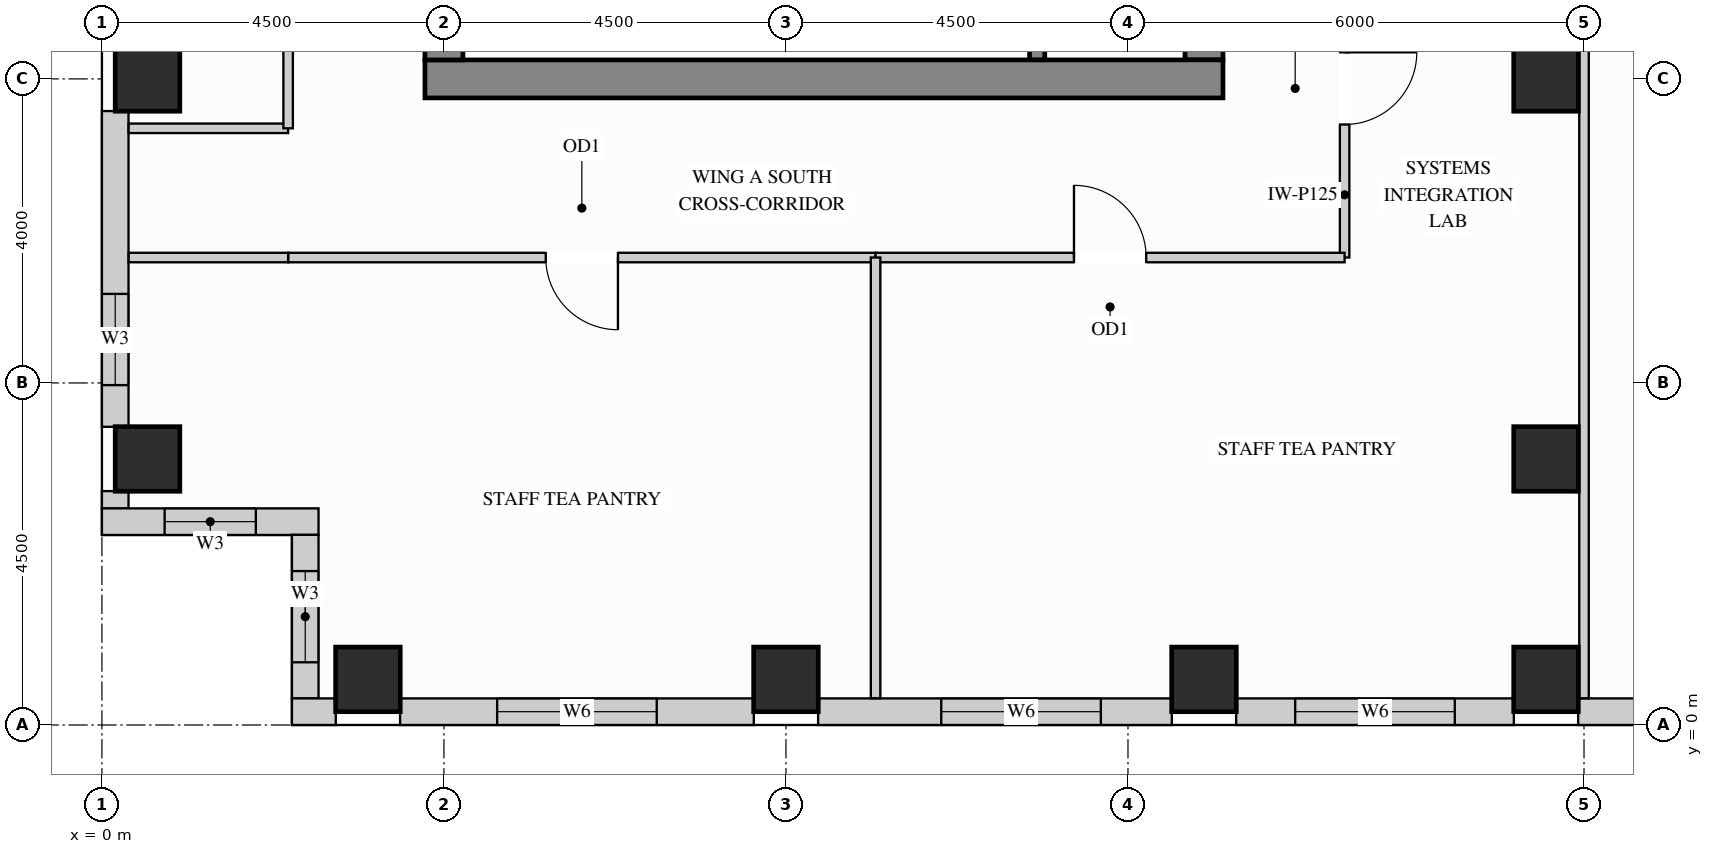
"""IFC4 building model, lengths in metres.
Left out: names, types, materials, properties, quantities, classifications, styles, units other than length and angle.
Written with IfcOpenShell. Run it as: python <this file> out.ifc"""

import sys

from ifc_helpers import new_model, si_unit, direction, frame, frame_2d, origin, origin_2d, place, context, subcontext, project, spatial, rectangle, extrude, source, transform, mapped, element, fill, save


model = new_model("IFC4")
c1 = context("Model", 3, precision=1e-05, world=origin(), true_north=direction((0.0, 1.0)))
c2 = subcontext(c1, "Body", "Model", "MODEL_VIEW")
j1 = project(units=[si_unit("LENGTHUNIT", "METRE"), si_unit("PLANEANGLEUNIT", "RADIAN")], contexts=[c1])
p1 = place(None, origin())
s1 = spatial("IfcSite", under=j1, at=p1, CompositionType="ELEMENT")
p2 = place(p1, origin())
s2 = spatial("IfcBuilding", under=s1, at=p2, CompositionType="ELEMENT")
p3 = place(p2, frame((0.0, 0.0, 266.4)))
s3 = spatial("IfcBuildingStorey", under=s2, at=p3, CompositionType="ELEMENT", Elevation=266.4)
m1 = source(origin(), c2, "Body", "SweptSolid", [
    extrude(rectangle(XDim=0.85, YDim=0.85, at=origin_2d()), origin(), (0.0, 0.0, 1.0), 3.4),
])
for number, where, z_axis, x_axis in (
    (1, (19.0, 3.5, 0.0), (0.0, 0.0, 1.0), (1.0, 0.0, 0.0)),
    (2, (19.0, 8.5, 0.0), (0.0, 0.0, 1.0), (1.0, 0.0, 0.0)),
    (3, (14.5, 0.6, 0.0), (0.0, 0.0, 1.0), (1.0, 0.0, 0.0)),
    (4, (19.0, 0.6, 0.0), (0.0, 0.0, 1.0), (1.0, 0.0, 0.0)),
    (5, (3.5, 0.6, 0.0), (0.0, 0.0, 1.0), (1.0, 0.0, 0.0)),
    (6, (9.0, 0.6, 0.0), (0.0, 0.0, 1.0), (1.0, 0.0, 0.0)),
    (7, (0.6, 3.5, 0.0), (0.0, 0.0, 1.0), (1.0, 0.0, 0.0)),
    (8, (0.6, 8.5, 0.0), (0.0, 0.0, 1.0), (1.0, 0.0, 0.0)),
):
    element("IfcColumn", number, at=place(p3, frame(where, z_axis=z_axis, x_axis=x_axis)), inside=s3, PredefinedType="COLUMN", context=c2, shape_type="MappedRepresentation", body=[
        mapped(m1, transform((0.0, 0.0, 0.0), x_axis=(1.0, 0.0, 0.0), y_axis=(0.0, 1.0, 0.0), z_axis=(0.0, 0.0, 1.0))),
    ])
m2 = source(origin(), c2, "Body", "SweptSolid", [
    extrude(rectangle(XDim=10.07, YDim=0.5, at=frame_2d((5.035, 0.0))), origin(), (0.0, 0.0, 1.0), 3.4),
])
p4 = place(p3, frame((14.5, 8.75, 0.0), z_axis=(0.0, 0.0, 1.0), x_axis=(0.0, 1.0, 0.0)))
e9 = element("IfcWall", 9, at=p4, inside=s3, PredefinedType="SHEAR", context=c2, shape_type="MappedRepresentation", body=[
    mapped(m2, transform((0.0, 0.0, 0.0), x_axis=(1.0, 0.0, 0.0), y_axis=(0.0, 1.0, 0.0), z_axis=(0.0, 0.0, 1.0))),
])
m3 = source(origin(), c2, "Body", "SweptSolid", [
    extrude(rectangle(XDim=10.5, YDim=0.5, at=frame_2d((5.25, 0.0))), origin(), (0.0, 0.0, 1.0), 3.4),
])
p5 = place(p3, frame((4.25, 8.5, 0.0), z_axis=(0.0, 0.0, 1.0), x_axis=(1.0, 0.0, 0.0)))
e10 = element("IfcWall", 10, at=p5, inside=s3, PredefinedType="SHEAR", context=c2, shape_type="MappedRepresentation", body=[
    mapped(m3, transform((0.0, 0.0, 0.0), x_axis=(1.0, 0.0, 0.0), y_axis=(0.0, 1.0, 0.0), z_axis=(0.0, 0.0, 1.0))),
])
m4 = source(origin(), c2, "Body", "SweptSolid", [
    extrude(rectangle(XDim=20.5, YDim=0.5, at=frame_2d((10.25, 0.0))), origin(), (0.0, 0.0, 1.0), 3.4),
])
p6 = place(p3, frame((4.5, 8.75, 0.0), z_axis=(0.0, 0.0, 1.0), x_axis=(0.0, 1.0, 0.0)))
e11 = element("IfcWall", 11, at=p6, inside=s3, PredefinedType="SHEAR", context=c2, shape_type="MappedRepresentation", body=[
    mapped(m4, transform((0.0, 0.0, 0.0), x_axis=(1.0, 0.0, 0.0), y_axis=(0.0, 1.0, 0.0), z_axis=(0.0, 0.0, 1.0))),
])
p7 = place(p3, frame((0.175, 8.077, 0.0), z_axis=(0.0, 0.0, 1.0), x_axis=(0.0, -1.0, 0.0)))
e12 = element("IfcWall", 12, at=p7, inside=s3, PredefinedType="SOLIDWALL", context=c2, shape_type="SweptSolid", body=[
    extrude(rectangle(XDim=4.154, YDim=0.35, at=frame_2d((2.077, 0.0))), origin(), (0.0, 0.0, 1.0), 3.385),
])
p8 = place(p7, frame((2.406, 0.0, 0.78)))
e13 = element("IfcOpeningElement", 13, at=p8, cuts=e12, PredefinedType="OPENING", context=c2, shape_type="SweptSolid", body=[
    extrude(rectangle(XDim=1.2, YDim=2.25, at=frame_2d((0.6, 1.125))), frame((0.0, 0.185, 0.0), z_axis=(0.0, -1.0, 0.0), x_axis=(1.0, 0.0, 0.0)), (0.0, 0.0, 1.0), 0.37),
])
m5 = source(origin(), c2, "Body", "SweptSolid", [
    extrude(rectangle(XDim=0.229, YDim=0.35, at=frame_2d((0.115, 0.0))), origin(), (0.0, 0.0, 1.0), 3.385),
])
p9 = place(p3, frame((0.175, 3.077, 0.0), z_axis=(0.0, 0.0, 1.0), x_axis=(0.0, -1.0, 0.0)))
e14 = element("IfcWall", 14, at=p9, inside=s3, PredefinedType="SOLIDWALL", context=c2, shape_type="MappedRepresentation", body=[
    mapped(m5, transform((0.0, 0.0, 0.0), x_axis=(1.0, 0.0, 0.0), y_axis=(0.0, 1.0, 0.0), z_axis=(0.0, 0.0, 1.0))),
])
p10 = place(p3, frame((0.0, 2.675, 0.0), z_axis=(0.0, 0.0, 1.0), x_axis=(1.0, 0.0, 0.0)))
e15 = element("IfcWall", 15, at=p10, inside=s3, PredefinedType="SOLIDWALL", context=c2, shape_type="SweptSolid", body=[
    extrude(rectangle(XDim=2.85, YDim=0.35, at=frame_2d((1.425, 0.0))), origin(), (0.0, 0.0, 1.0), 3.385),
])
p11 = place(p10, frame((0.825, 0.0, 0.78)))
e16 = element("IfcOpeningElement", 16, at=p11, cuts=e15, PredefinedType="OPENING", context=c2, shape_type="SweptSolid", body=[
    extrude(rectangle(XDim=1.2, YDim=2.25, at=frame_2d((0.6, 1.125))), frame((0.0, 0.185, 0.0), z_axis=(0.0, -1.0, 0.0), x_axis=(1.0, 0.0, 0.0)), (0.0, 0.0, 1.0), 0.37),
])
p12 = place(p3, frame((2.675, 2.502, 0.0), z_axis=(0.0, 0.0, 1.0), x_axis=(0.0, -1.0, 0.0)))
e17 = element("IfcWall", 17, at=p12, inside=s3, PredefinedType="SOLIDWALL", context=c2, shape_type="SweptSolid", body=[
    extrude(rectangle(XDim=2.154, YDim=0.35, at=frame_2d((1.077, 0.0))), origin(), (0.0, 0.0, 1.0), 3.385),
])
p13 = place(p12, frame((0.477, 0.0, 0.78)))
e18 = element("IfcOpeningElement", 18, at=p13, cuts=e17, PredefinedType="OPENING", context=c2, shape_type="SweptSolid", body=[
    extrude(rectangle(XDim=1.2, YDim=2.25, at=frame_2d((0.6, 1.125))), frame((0.0, 0.185, 0.0), z_axis=(0.0, -1.0, 0.0), x_axis=(1.0, 0.0, 0.0)), (0.0, 0.0, 1.0), 0.37),
])
m6 = source(origin(), c2, "Body", "SweptSolid", [
    extrude(rectangle(XDim=0.577, YDim=0.35, at=frame_2d((0.289, 0.0))), origin(), (0.0, 0.0, 1.0), 3.385),
])
p14 = place(p3, frame((2.5, 0.175, 0.0), z_axis=(0.0, 0.0, 1.0), x_axis=(1.0, 0.0, 0.0)))
e19 = element("IfcWall", 19, at=p14, inside=s3, PredefinedType="SOLIDWALL", context=c2, shape_type="MappedRepresentation", body=[
    mapped(m6, transform((0.0, 0.0, 0.0), x_axis=(1.0, 0.0, 0.0), y_axis=(0.0, 1.0, 0.0), z_axis=(0.0, 0.0, 1.0))),
])
p15 = place(p3, frame((3.923, 0.175, 0.0), z_axis=(0.0, 0.0, 1.0), x_axis=(1.0, 0.0, 0.0)))
e20 = element("IfcWall", 20, at=p15, inside=s3, PredefinedType="SOLIDWALL", context=c2, shape_type="SweptSolid", body=[
    extrude(rectangle(XDim=4.654, YDim=0.35, at=frame_2d((2.327, 0.0))), origin(), (0.0, 0.0, 1.0), 3.385),
])
p16 = place(p15, frame((1.277, 0.0, 0.78)))
e21 = element("IfcOpeningElement", 21, at=p16, cuts=e20, PredefinedType="OPENING", context=c2, shape_type="SweptSolid", body=[
    extrude(rectangle(XDim=2.1, YDim=2.25, at=frame_2d((1.05, 1.125))), frame((0.0, 0.185, 0.0), z_axis=(0.0, -1.0, 0.0), x_axis=(1.0, 0.0, 0.0)), (0.0, 0.0, 1.0), 0.37),
])
p17 = place(p3, frame((9.423, 0.175, 0.0), z_axis=(0.0, 0.0, 1.0), x_axis=(1.0, 0.0, 0.0)))
e22 = element("IfcWall", 22, at=p17, inside=s3, PredefinedType="SOLIDWALL", context=c2, shape_type="SweptSolid", body=[
    extrude(rectangle(XDim=4.654, YDim=0.35, at=frame_2d((2.327, 0.0))), origin(), (0.0, 0.0, 1.0), 3.385),
])
p18 = place(p17, frame((1.62, 0.0, 0.78)))
e23 = element("IfcOpeningElement", 23, at=p18, cuts=e22, PredefinedType="OPENING", context=c2, shape_type="SweptSolid", body=[
    extrude(rectangle(XDim=2.1, YDim=2.25, at=frame_2d((1.05, 1.125))), frame((0.0, 0.185, 0.0), z_axis=(0.0, -1.0, 0.0), x_axis=(1.0, 0.0, 0.0)), (0.0, 0.0, 1.0), 0.37),
])
p19 = place(p3, frame((14.923, 0.175, 0.0), z_axis=(0.0, 0.0, 1.0), x_axis=(1.0, 0.0, 0.0)))
e24 = element("IfcWall", 24, at=p19, inside=s3, PredefinedType="SOLIDWALL", context=c2, shape_type="SweptSolid", body=[
    extrude(rectangle(XDim=3.654, YDim=0.35, at=frame_2d((1.827, 0.0))), origin(), (0.0, 0.0, 1.0), 3.385),
])
p20 = place(p19, frame((0.777, 0.0, 0.78)))
e25 = element("IfcOpeningElement", 25, at=p20, cuts=e24, PredefinedType="OPENING", context=c2, shape_type="SweptSolid", body=[
    extrude(rectangle(XDim=2.1, YDim=2.25, at=frame_2d((1.05, 1.125))), frame((0.0, 0.185, 0.0), z_axis=(0.0, -1.0, 0.0), x_axis=(1.0, 0.0, 0.0)), (0.0, 0.0, 1.0), 0.37),
])
p21 = place(p3, frame((19.423, 0.175, 0.0), z_axis=(0.0, 0.0, 1.0), x_axis=(1.0, 0.0, 0.0)))
e26 = element("IfcWall", 26, at=p21, inside=s3, PredefinedType="SOLIDWALL", context=c2, shape_type="SweptSolid", body=[
    extrude(rectangle(XDim=3.554, YDim=0.35, at=frame_2d((1.777, 0.0))), origin(), (0.0, 0.0, 1.0), 3.385),
])
p22 = place(p21, frame((1.031, 0.0, 0.78)))
e27 = element("IfcOpeningElement", 27, at=p22, cuts=e26, PredefinedType="OPENING", context=c2, shape_type="SweptSolid", body=[
    extrude(rectangle(XDim=1.5, YDim=2.0, at=frame_2d((0.75, 1.0))), frame((0.0, 0.185, 0.0), z_axis=(0.0, -1.0, 0.0), x_axis=(1.0, 0.0, 0.0)), (0.0, 0.0, 1.0), 0.37),
])
p23 = place(p3, frame((16.35, 6.15, 0.0), z_axis=(0.0, 0.0, 1.0), x_axis=(0.0, 1.0, 0.0)))
e28 = element("IfcWall", 28, at=p23, inside=s3, PredefinedType="PARTITIONING", context=c2, shape_type="SweptSolid", body=[
    extrude(rectangle(XDim=4.45, YDim=0.125, at=frame_2d((2.225, 0.0))), origin(), (0.0, 0.0, 1.0), 3.385),
])
p24 = place(p23, frame((1.75, 0.0, 0.0)))
e29 = element("IfcOpeningElement", 29, at=p24, cuts=e28, PredefinedType="OPENING", context=c2, shape_type="SweptSolid", body=[
    extrude(rectangle(XDim=0.95, YDim=2.15, at=frame_2d((0.475, 1.075))), frame((0.0, 0.073, 0.0), z_axis=(0.0, -1.0, 0.0), x_axis=(1.0, 0.0, 0.0)), (0.0, 0.0, 1.0), 0.145),
])
m7 = source(origin(), c2, "Body", "SweptSolid", [
    extrude(rectangle(XDim=2.098, YDim=0.125, at=frame_2d((1.049, 0.0))), origin(), (0.0, 0.0, 1.0), 3.385),
])
p25 = place(p3, frame((0.352, 7.85, 0.0), z_axis=(0.0, 0.0, 1.0), x_axis=(1.0, 0.0, 0.0)))
e30 = element("IfcWall", 30, at=p25, inside=s3, PredefinedType="PARTITIONING", context=c2, shape_type="MappedRepresentation", body=[
    mapped(m7, transform((0.0, 0.0, 0.0), x_axis=(1.0, 0.0, 0.0), y_axis=(0.0, 1.0, 0.0), z_axis=(0.0, 0.0, 1.0))),
])
m8 = source(origin(), c2, "Body", "SweptSolid", [
    extrude(rectangle(XDim=10.248, YDim=0.125, at=frame_2d((5.124, 0.0))), origin(), (0.0, 0.0, 1.0), 3.385),
])
p26 = place(p3, frame((19.5, 0.352, 0.0), z_axis=(0.0, 0.0, 1.0), x_axis=(0.0, 1.0, 0.0)))
e31 = element("IfcWall", 31, at=p26, inside=s3, PredefinedType="PARTITIONING", context=c2, shape_type="MappedRepresentation", body=[
    mapped(m8, transform((0.0, 0.0, 0.0), x_axis=(1.0, 0.0, 0.0), y_axis=(0.0, 1.0, 0.0), z_axis=(0.0, 0.0, 1.0))),
])
p27 = place(p3, frame((2.45, 6.15, 0.0), z_axis=(0.0, 0.0, 1.0), x_axis=(1.0, 0.0, 0.0)))
e32 = element("IfcWall", 32, at=p27, inside=s3, PredefinedType="PARTITIONING", context=c2, shape_type="SweptSolid", body=[
    extrude(rectangle(XDim=7.729, YDim=0.125, at=frame_2d((3.865, 0.0))), origin(), (0.0, 0.0, 1.0), 3.385),
])
p28 = place(p27, frame((3.389, 0.0, 0.0)))
e33 = element("IfcOpeningElement", 33, at=p28, cuts=e32, PredefinedType="OPENING", context=c2, shape_type="SweptSolid", body=[
    extrude(rectangle(XDim=0.95, YDim=2.15, at=frame_2d((0.475, 1.075))), frame((0.0, 0.073, 0.0), z_axis=(0.0, -1.0, 0.0), x_axis=(1.0, 0.0, 0.0)), (0.0, 0.0, 1.0), 0.145),
])
p29 = place(p3, frame((10.179, 6.15, 0.0), z_axis=(0.0, 0.0, 1.0), x_axis=(1.0, 0.0, 0.0)))
e34 = element("IfcWall", 34, at=p29, inside=s3, PredefinedType="PARTITIONING", context=c2, shape_type="SweptSolid", body=[
    extrude(rectangle(XDim=6.171, YDim=0.125, at=frame_2d((3.085, 0.0))), origin(), (0.0, 0.0, 1.0), 3.385),
])
p30 = place(p29, frame((2.611, 0.0, 0.0)))
e35 = element("IfcOpeningElement", 35, at=p30, cuts=e34, PredefinedType="OPENING", context=c2, shape_type="SweptSolid", body=[
    extrude(rectangle(XDim=0.95, YDim=2.15, at=frame_2d((0.475, 1.075))), frame((0.0, 0.073, 0.0), z_axis=(0.0, -1.0, 0.0), x_axis=(1.0, 0.0, 0.0)), (0.0, 0.0, 1.0), 0.145),
])
p31 = place(p3, frame((0.352, 6.15, 0.0), z_axis=(0.0, 0.0, 1.0), x_axis=(1.0, 0.0, 0.0)))
e36 = element("IfcWall", 36, at=p31, inside=s3, PredefinedType="PARTITIONING", context=c2, shape_type="MappedRepresentation", body=[
    mapped(m7, transform((0.0, 0.0, 0.0), x_axis=(1.0, 0.0, 0.0), y_axis=(0.0, 1.0, 0.0), z_axis=(0.0, 0.0, 1.0))),
])
m9 = source(origin(), c2, "Body", "SweptSolid", [
    extrude(rectangle(XDim=5.798, YDim=0.125, at=frame_2d((2.899, 0.0))), origin(), (0.0, 0.0, 1.0), 3.385),
])
p32 = place(p3, frame((10.179, 0.352, 0.0), z_axis=(0.0, 0.0, 1.0), x_axis=(0.0, 1.0, 0.0)))
e37 = element("IfcWall", 37, at=p32, inside=s3, PredefinedType="PARTITIONING", context=c2, shape_type="MappedRepresentation", body=[
    mapped(m9, transform((0.0, 0.0, 0.0), x_axis=(1.0, 0.0, 0.0), y_axis=(0.0, 1.0, 0.0), z_axis=(0.0, 0.0, 1.0))),
])
p33 = place(p3, frame((2.45, 7.85, 0.0), z_axis=(0.0, 0.0, 1.0), x_axis=(0.0, 1.0, 0.0)))
e38 = element("IfcWall", 38, at=p33, inside=s3, PredefinedType="PARTITIONING", context=c2, shape_type="SweptSolid", body=[
    extrude(rectangle(XDim=7.25, YDim=0.125, at=frame_2d((3.625, 0.0))), origin(), (0.0, 0.0, 1.0), 3.385),
])
p34 = place(p33, frame((3.15, 0.0, 0.0)))
e39 = element("IfcOpeningElement", 39, at=p34, cuts=e38, PredefinedType="OPENING", context=c2, shape_type="SweptSolid", body=[
    extrude(rectangle(XDim=0.95, YDim=2.15, at=frame_2d((0.475, 1.075))), frame((0.0, 0.073, 0.0), z_axis=(0.0, -1.0, 0.0), x_axis=(1.0, 0.0, 0.0)), (0.0, 0.0, 1.0), 0.145),
])
m10 = source(origin(), c2, "Body", "SweptSolid", [
    extrude(rectangle(XDim=3.803, YDim=0.2, at=frame_2d((1.901, 0.0))), origin(), (0.0, 0.0, 1.0), 3.4),
])
p35 = place(p3, frame((12.305, 8.752, 0.0), z_axis=(0.0, 0.0, 1.0), x_axis=(0.0, 1.0, 0.0)))
e40 = element("IfcWall", 40, at=p35, inside=s3, PredefinedType="SHEAR", context=c2, shape_type="MappedRepresentation", body=[
    mapped(m10, transform((0.0, 0.0, 0.0), x_axis=(1.0, 0.0, 0.0), y_axis=(0.0, 1.0, 0.0), z_axis=(0.0, 0.0, 1.0))),
])
m11 = source(origin(), c2, "Body", "SweptSolid", [
    extrude(rectangle(XDim=0.95, YDim=2.15, at=frame_2d((0.475, 1.075))), frame((0.0, 0.025, 0.0), z_axis=(0.0, -1.0, 0.0), x_axis=(1.0, 0.0, 0.0)), (0.0, 0.0, 1.0), 0.05),
])
p36 = place(p24, origin())
e41 = element("IfcDoor", 41, at=p36, inside=s3, OperationType="SINGLE_SWING_RIGHT", PredefinedType="DOOR", context=c2, shape_type="MappedRepresentation", body=[
    mapped(m11, transform((0.0, 0.0, 0.0), x_axis=(1.0, 0.0, 0.0), y_axis=(0.0, 1.0, 0.0), z_axis=(0.0, 0.0, 1.0))),
])
fill(e29, e41)
p37 = place(p28, origin())
e42 = element("IfcDoor", 42, at=p37, inside=s3, OperationType="SINGLE_SWING_RIGHT", PredefinedType="DOOR", context=c2, shape_type="MappedRepresentation", body=[
    mapped(m11, transform((0.0, 0.0, 0.0), x_axis=(1.0, 0.0, 0.0), y_axis=(0.0, 1.0, 0.0), z_axis=(0.0, 0.0, 1.0))),
])
fill(e33, e42)
p38 = place(p30, origin())
e43 = element("IfcDoor", 43, at=p38, inside=s3, OperationType="SINGLE_SWING_LEFT", PredefinedType="DOOR", context=c2, shape_type="MappedRepresentation", body=[
    mapped(m11, transform((0.0, 0.0, 0.0), x_axis=(1.0, 0.0, 0.0), y_axis=(0.0, 1.0, 0.0), z_axis=(0.0, 0.0, 1.0))),
])
fill(e35, e43)
m12 = source(origin(), c2, "Body", "SweptSolid", [
    extrude(rectangle(XDim=1.2, YDim=2.25, at=frame_2d((0.6, 1.125))), frame((0.0, 0.03, 0.0), z_axis=(0.0, -1.0, 0.0), x_axis=(1.0, 0.0, 0.0)), (0.0, 0.0, 1.0), 0.06),
])
p39 = place(p8, origin())
e44 = element("IfcWindow", 44, at=p39, inside=s3, PartitioningType="SINGLE_PANEL", PredefinedType="WINDOW", context=c2, shape_type="MappedRepresentation", body=[
    mapped(m12, transform((0.0, 0.0, 0.0), x_axis=(1.0, 0.0, 0.0), y_axis=(0.0, 1.0, 0.0), z_axis=(0.0, 0.0, 1.0))),
])
fill(e13, e44)
p40 = place(p11, origin())
e45 = element("IfcWindow", 45, at=p40, inside=s3, PartitioningType="SINGLE_PANEL", PredefinedType="WINDOW", context=c2, shape_type="MappedRepresentation", body=[
    mapped(m12, transform((0.0, 0.0, 0.0), x_axis=(1.0, 0.0, 0.0), y_axis=(0.0, 1.0, 0.0), z_axis=(0.0, 0.0, 1.0))),
])
fill(e16, e45)
p41 = place(p13, origin())
e46 = element("IfcWindow", 46, at=p41, inside=s3, PartitioningType="SINGLE_PANEL", PredefinedType="WINDOW", context=c2, shape_type="MappedRepresentation", body=[
    mapped(m12, transform((0.0, 0.0, 0.0), x_axis=(1.0, 0.0, 0.0), y_axis=(0.0, 1.0, 0.0), z_axis=(0.0, 0.0, 1.0))),
])
fill(e18, e46)
m13 = source(origin(), c2, "Body", "SweptSolid", [
    extrude(rectangle(XDim=2.1, YDim=2.25, at=frame_2d((1.05, 1.125))), frame((0.0, 0.03, 0.0), z_axis=(0.0, -1.0, 0.0), x_axis=(1.0, 0.0, 0.0)), (0.0, 0.0, 1.0), 0.06),
])
p42 = place(p16, origin())
e47 = element("IfcWindow", 47, at=p42, inside=s3, PartitioningType="SINGLE_PANEL", PredefinedType="WINDOW", context=c2, shape_type="MappedRepresentation", body=[
    mapped(m13, transform((0.0, 0.0, 0.0), x_axis=(1.0, 0.0, 0.0), y_axis=(0.0, 1.0, 0.0), z_axis=(0.0, 0.0, 1.0))),
])
fill(e21, e47)
p43 = place(p18, origin())
e48 = element("IfcWindow", 48, at=p43, inside=s3, PartitioningType="SINGLE_PANEL", PredefinedType="WINDOW", context=c2, shape_type="MappedRepresentation", body=[
    mapped(m13, transform((0.0, 0.0, 0.0), x_axis=(1.0, 0.0, 0.0), y_axis=(0.0, 1.0, 0.0), z_axis=(0.0, 0.0, 1.0))),
])
fill(e23, e48)
p44 = place(p20, origin())
e49 = element("IfcWindow", 49, at=p44, inside=s3, PartitioningType="SINGLE_PANEL", PredefinedType="WINDOW", context=c2, shape_type="MappedRepresentation", body=[
    mapped(m13, transform((0.0, 0.0, 0.0), x_axis=(1.0, 0.0, 0.0), y_axis=(0.0, 1.0, 0.0), z_axis=(0.0, 0.0, 1.0))),
])
fill(e25, e49)
save(model, sys.argv[1])
